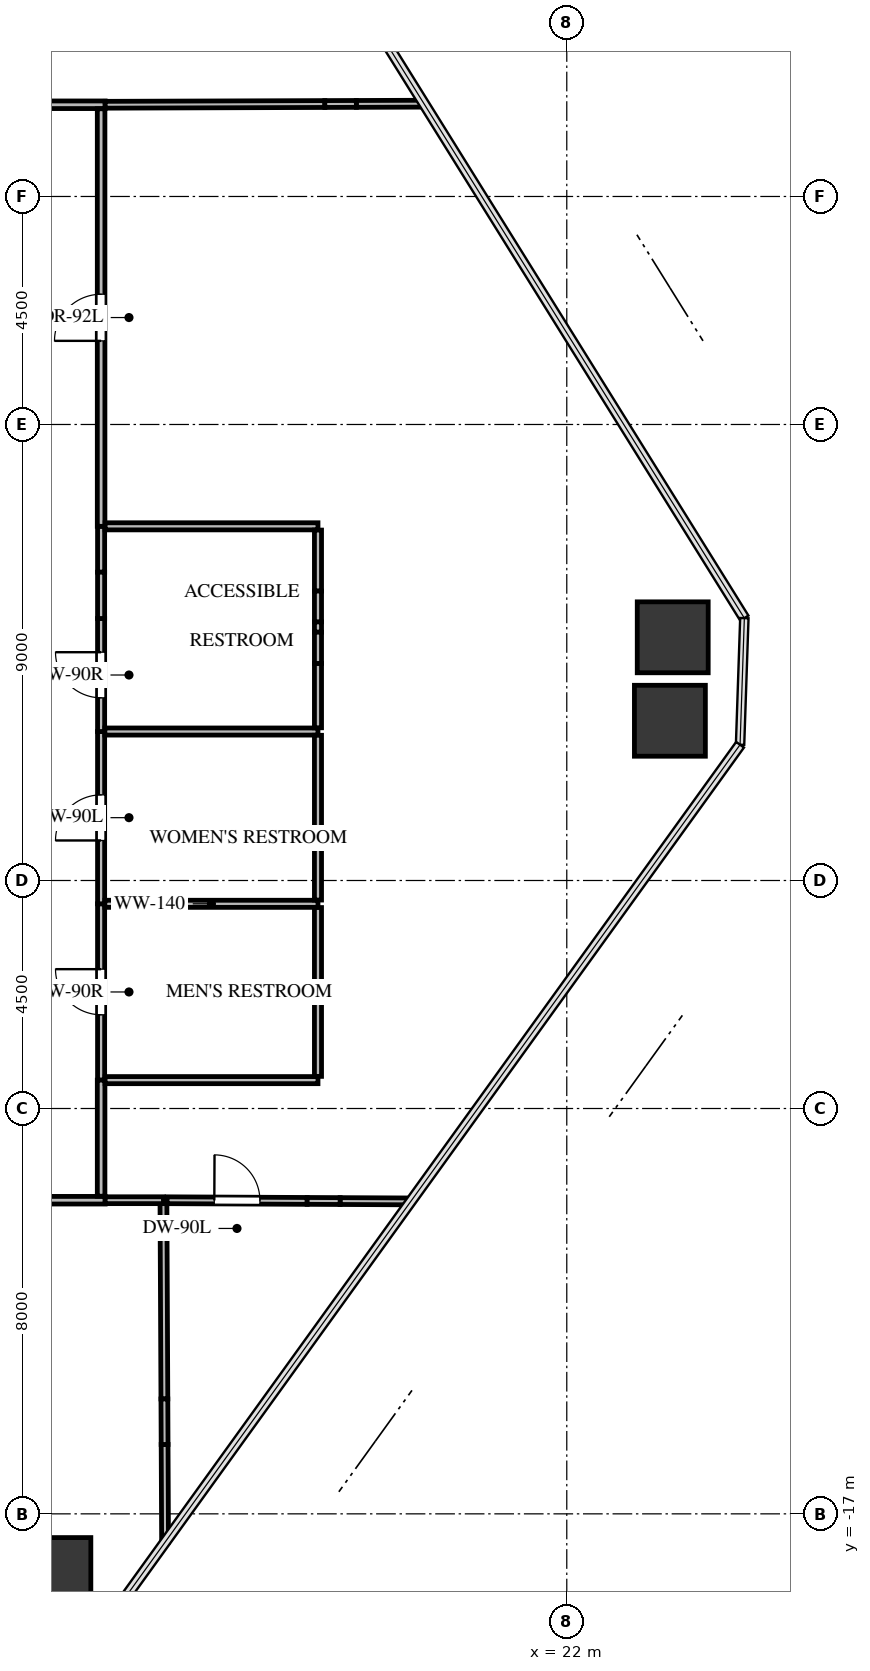
"""IFC4 building model, lengths in metres.
Left out: names, types, materials, properties, quantities, classifications, styles, units other than length and angle.
Written with IfcOpenShell. Run it as: python <this file> out.ifc"""

import sys

from ifc_helpers import new_model, si_unit, direction, frame, frame_2d, origin, origin_2d, place, context, subcontext, project, spatial, rectangle, extrude, source, transform, mapped, element, fill, save


model = new_model("IFC4")
c1 = context("Model", 3, precision=1e-05, world=origin(), true_north=direction((0.0, 1.0)))
c2 = subcontext(c1, "Body", "Model", "MODEL_VIEW")
j1 = project(units=[si_unit("LENGTHUNIT", "METRE"), si_unit("PLANEANGLEUNIT", "RADIAN")], contexts=[c1])
p1 = place(None, origin())
s1 = spatial("IfcSite", under=j1, at=p1, CompositionType="ELEMENT")
p2 = place(p1, origin())
s2 = spatial("IfcBuilding", under=s1, at=p2, CompositionType="ELEMENT")
p3 = place(p2, frame((0.0, 0.0, 81.3)))
s3 = spatial("IfcBuildingStorey", under=s2, at=p3, CompositionType="ELEMENT", Elevation=81.3)
m1 = source(origin(), c2, "Body", "SweptSolid", [
    extrude(rectangle(XDim=1.4, YDim=1.4, at=origin_2d()), origin(), (0.0, 0.0, 1.0), 3.0),
])
for number, where, z_axis, x_axis in (
    (1, (24.091, 0.3, -0.24), (0.0, 0.0, 1.0), (1.0, 0.0, 0.0)),
    (2, (24.035, -1.347, -0.24), (0.0, 0.0, 1.0), (1.0, 0.0, 0.0)),
    (3, (11.907, -18.168, -0.24), (0.0, 0.0, 1.0), (1.0, 0.0, 0.0)),
):
    element("IfcColumn", number, at=place(p3, frame(where, z_axis=z_axis, x_axis=x_axis)), inside=s3, PredefinedType="COLUMN", context=c2, shape_type="MappedRepresentation", body=[
        mapped(m1, transform((0.0, 0.0, 0.0), x_axis=(1.0, 0.0, 0.0), y_axis=(0.0, 1.0, 0.0), z_axis=(0.0, 0.0, 1.0), scale=1.0)),
    ])
p4 = place(p3, frame((12.81, -8.44, 0.0), z_axis=(0.0, 0.0, 1.0), x_axis=(0.0, 1.0, 0.0)))
e4 = element("IfcWall", 4, at=p4, inside=s3, PredefinedType="PARTITIONING", context=c2, shape_type="SweptSolid", body=[
    extrude(rectangle(XDim=3.48, YDim=0.14, at=frame_2d((1.74, 0.0))), origin(), (0.0, 0.0, 1.0), 2.745),
])
p5 = place(p4, frame((1.29, 0.0, 0.0)))
e5 = element("IfcOpeningElement", 5, at=p5, cuts=e4, PredefinedType="OPENING", context=c2, shape_type="SweptSolid", body=[
    extrude(rectangle(XDim=0.9, YDim=2.05, at=frame_2d((0.45, 1.025))), frame((0.0, 0.08, 0.0), z_axis=(0.0, -1.0, 0.0), x_axis=(1.0, 0.0, 0.0)), (0.0, 0.0, 1.0), 0.16),
])
p6 = place(p3, frame((12.81, -4.96, 0.0), z_axis=(0.0, 0.0, 1.0), x_axis=(0.0, 1.0, 0.0)))
e6 = element("IfcWall", 6, at=p6, inside=s3, PredefinedType="PARTITIONING", context=c2, shape_type="SweptSolid", body=[
    extrude(rectangle(XDim=3.4, YDim=0.14, at=frame_2d((1.7, 0.0))), origin(), (0.0, 0.0, 1.0), 2.745),
])
p7 = place(p6, frame((1.25, 0.0, 0.0)))
e7 = element("IfcOpeningElement", 7, at=p7, cuts=e6, PredefinedType="OPENING", context=c2, shape_type="SweptSolid", body=[
    extrude(rectangle(XDim=0.9, YDim=2.05, at=frame_2d((0.45, 1.025))), frame((0.0, 0.08, 0.0), z_axis=(0.0, -1.0, 0.0), x_axis=(1.0, 0.0, 0.0)), (0.0, 0.0, 1.0), 0.16),
])
p8 = place(p3, frame((12.81, -1.56, 0.0), z_axis=(0.0, 0.0, 1.0), x_axis=(0.0, 1.0, 0.0)))
e8 = element("IfcWall", 8, at=p8, inside=s3, PredefinedType="PARTITIONING", context=c2, shape_type="SweptSolid", body=[
    extrude(rectangle(XDim=2.231, YDim=0.14, at=frame_2d((1.116, 0.0))), origin(), (0.0, 0.0, 1.0), 2.745),
])
p9 = place(p8, frame((0.666, 0.0, 0.0)))
e9 = element("IfcOpeningElement", 9, at=p9, cuts=e8, PredefinedType="OPENING", context=c2, shape_type="SweptSolid", body=[
    extrude(rectangle(XDim=0.9, YDim=2.05, at=frame_2d((0.45, 1.025))), frame((0.0, 0.08, 0.0), z_axis=(0.0, -1.0, 0.0), x_axis=(1.0, 0.0, 0.0)), (0.0, 0.0, 1.0), 0.16),
])
p10 = place(p3, frame((12.81, 1.585, 0.0), z_axis=(0.0, 0.0, 1.0), x_axis=(0.0, 1.0, 0.0)))
e10 = element("IfcWall", 10, at=p10, inside=s3, PredefinedType="PARTITIONING", context=c2, shape_type="SweptSolid", body=[
    extrude(rectangle(XDim=0.905, YDim=0.14, at=frame_2d((0.453, 0.0))), origin(), (0.0, 0.0, 1.0), 2.745),
])
p11 = place(p3, frame((12.81, 0.671, 0.0), z_axis=(0.0, 0.0, 1.0), x_axis=(0.0, 1.0, 0.0)))
e11 = element("IfcWall", 11, at=p11, inside=s3, PredefinedType="PARTITIONING", context=c2, shape_type="SweptSolid", body=[
    extrude(rectangle(XDim=0.914, YDim=0.14, at=frame_2d((0.457, 0.0))), origin(), (0.0, 0.0, 1.0), 1.83),
])
p12 = place(p3, frame((12.89, 10.81, 0.0), z_axis=(0.0, 0.0, 1.0), x_axis=(-1.0, 0.0, 0.0)))
e12 = element("IfcWall", 12, at=p12, inside=s3, PredefinedType="PARTITIONING", context=c2, shape_type="SweptSolid", body=[
    extrude(rectangle(XDim=1.847, YDim=0.15, at=frame_2d((0.924, 0.0))), origin(), (0.0, 0.0, 1.0), 2.745),
])
p13 = place(p3, frame((5.817, -10.81, 0.0), z_axis=(0.0, 0.0, 1.0), x_axis=(1.0, 0.0, 0.0)))
e13 = element("IfcWall", 13, at=p13, inside=s3, PredefinedType="PARTITIONING", context=c2, shape_type="SweptSolid", body=[
    extrude(rectangle(XDim=7.073, YDim=0.15, at=frame_2d((3.536, 0.0))), origin(), (0.0, 0.0, 1.0), 1.83),
])
p14 = place(p3, frame((12.81, 2.49, 0.0), z_axis=(0.0, 0.0, 1.0), x_axis=(0.0, 1.0, 0.0)))
e14 = element("IfcWall", 14, at=p14, inside=s3, PredefinedType="PARTITIONING", context=c2, shape_type="SweptSolid", body=[
    extrude(rectangle(XDim=8.241, YDim=0.15, at=frame_2d((4.121, 0.0))), origin(), (0.0, 0.0, 1.0), 2.745),
])
p15 = place(p14, frame((3.66, 0.0, 0.0)))
e15 = element("IfcOpeningElement", 15, at=p15, cuts=e14, PredefinedType="OPENING", context=c2, shape_type="SweptSolid", body=[
    extrude(rectangle(XDim=0.92, YDim=2.1, at=frame_2d((0.46, 1.05))), frame((0.0, 0.085, 0.0), z_axis=(0.0, -1.0, 0.0), x_axis=(1.0, 0.0, 0.0)), (0.0, 0.0, 1.0), 0.17),
])
p16 = place(p3, frame((12.81, -10.731, 0.0), z_axis=(0.0, 0.0, 1.0), x_axis=(0.0, 1.0, 0.0)))
e16 = element("IfcWall", 16, at=p16, inside=s3, PredefinedType="PARTITIONING", context=c2, shape_type="SweptSolid", body=[
    extrude(rectangle(XDim=2.291, YDim=0.15, at=frame_2d((1.146, 0.0))), origin(), (0.0, 0.0, 1.0), 2.745),
])
p17 = place(p3, frame((12.884, -4.96, 0.0), z_axis=(0.0, 0.0, 1.0), x_axis=(1.0, 0.0, 0.0)))
e17 = element("IfcWall", 17, at=p17, inside=s3, PredefinedType="PARTITIONING", context=c2, shape_type="SweptSolid", body=[
    extrude(rectangle(XDim=4.206, YDim=0.14, at=frame_2d((2.103, 0.0))), origin(), (0.0, 0.0, 1.0), 2.745),
])
p18 = place(p3, frame((17.09, -8.44, 0.0), z_axis=(0.0, 0.0, 1.0), x_axis=(-1.0, 0.0, 0.0)))
e18 = element("IfcWall", 18, at=p18, inside=s3, PredefinedType="PARTITIONING", context=c2, shape_type="SweptSolid", body=[
    extrude(rectangle(XDim=4.201, YDim=0.14, at=frame_2d((2.101, 0.0))), origin(), (0.0, 0.0, 1.0), 2.745),
])
p19 = place(p3, frame((17.09, -5.034, 0.0), z_axis=(0.0, 0.0, 1.0), x_axis=(0.0, -1.0, 0.0)))
e19 = element("IfcWall", 19, at=p19, inside=s3, PredefinedType="PARTITIONING", context=c2, shape_type="SweptSolid", body=[
    extrude(rectangle(XDim=3.332, YDim=0.14, at=frame_2d((1.666, 0.0))), origin(), (0.0, 0.0, 1.0), 2.745),
])
p20 = place(p3, frame((12.884, -1.56, 0.0), z_axis=(0.0, 0.0, 1.0), x_axis=(1.0, 0.0, 0.0)))
e20 = element("IfcWall", 20, at=p20, inside=s3, PredefinedType="PARTITIONING", context=c2, shape_type="SweptSolid", body=[
    extrude(rectangle(XDim=4.206, YDim=0.14, at=frame_2d((2.103, 0.0))), origin(), (0.0, 0.0, 1.0), 2.745),
])
p21 = place(p3, frame((17.09, -1.634, 0.0), z_axis=(0.0, 0.0, 1.0), x_axis=(0.0, -1.0, 0.0)))
e21 = element("IfcWall", 21, at=p21, inside=s3, PredefinedType="PARTITIONING", context=c2, shape_type="SweptSolid", body=[
    extrude(rectangle(XDim=3.252, YDim=0.14, at=frame_2d((1.626, 0.0))), origin(), (0.0, 0.0, 1.0), 2.745),
])
p22 = place(p3, frame((12.889, 2.49, 0.0), z_axis=(0.0, 0.0, 1.0), x_axis=(1.0, 0.0, 0.0)))
e22 = element("IfcWall", 22, at=p22, inside=s3, PredefinedType="PARTITIONING", context=c2, shape_type="SweptSolid", body=[
    extrude(rectangle(XDim=4.201, YDim=0.14, at=frame_2d((2.101, 0.0))), origin(), (0.0, 0.0, 1.0), 2.745),
])
p23 = place(p3, frame((17.09, 2.416, 0.0), z_axis=(0.0, 0.0, 1.0), x_axis=(0.0, -1.0, 0.0)))
e23 = element("IfcWall", 23, at=p23, inside=s3, PredefinedType="PARTITIONING", context=c2, shape_type="SweptSolid", body=[
    extrude(rectangle(XDim=1.204, YDim=0.14, at=frame_2d((0.602, 0.0))), origin(), (0.0, 0.0, 1.0), 2.745),
])
p24 = place(p3, frame((17.09, 0.606, 0.0), z_axis=(0.0, 0.0, 1.0), x_axis=(0.0, -1.0, 0.0)))
e24 = element("IfcWall", 24, at=p24, inside=s3, PredefinedType="PARTITIONING", context=c2, shape_type="SweptSolid", body=[
    extrude(rectangle(XDim=0.205, YDim=0.14, at=frame_2d((0.103, 0.0))), origin(), (0.0, 0.0, 1.0), 2.745),
])
p25 = place(p3, frame((17.09, -0.216, 0.0), z_axis=(0.0, 0.0, 1.0), x_axis=(0.0, -1.0, 0.0)))
e25 = element("IfcWall", 25, at=p25, inside=s3, PredefinedType="PARTITIONING", context=c2, shape_type="SweptSolid", body=[
    extrude(rectangle(XDim=1.27, YDim=0.14, at=frame_2d((0.635, 0.0))), origin(), (0.0, 0.0, 1.0), 2.745),
])
p26 = place(p3, frame((17.09, 1.212, 0.0), z_axis=(0.0, 0.0, 1.0), x_axis=(0.0, -1.0, 0.0)))
e26 = element("IfcWall", 26, at=p26, inside=s3, PredefinedType="PARTITIONING", context=c2, shape_type="SweptSolid", body=[
    extrude(rectangle(XDim=0.606, YDim=0.14, at=frame_2d((0.303, 0.0))), origin(), (0.0, 0.0, 1.0), 1.83),
])
p27 = place(p3, frame((17.09, 0.401, 0.0), z_axis=(0.0, 0.0, 1.0), x_axis=(0.0, -1.0, 0.0)))
e27 = element("IfcWall", 27, at=p27, inside=s3, PredefinedType="PARTITIONING", context=c2, shape_type="SweptSolid", body=[
    extrude(rectangle(XDim=0.617, YDim=0.14, at=frame_2d((0.309, 0.0))), origin(), (0.0, 0.0, 1.0), 1.83),
])
p28 = place(p3, frame((19.182, 10.831, 0.0), z_axis=(0.0, 0.0, 1.0), x_axis=(-0.999994579825, -0.00329246432, 0.0)))
e28 = element("IfcWall", 28, at=p28, inside=s3, PredefinedType="PARTITIONING", context=c2, shape_type="SweptSolid", body=[
    extrude(rectangle(XDim=1.335, YDim=0.135, at=frame_2d((0.667, 0.0))), origin(), (0.0, 0.0, 1.0), 2.745),
])
p29 = place(p3, frame((17.225, 10.825, 0.0), z_axis=(0.0, 0.0, 1.0), x_axis=(-0.999994480721, -0.003322427884, 0.0)))
e29 = element("IfcWall", 29, at=p29, inside=s3, PredefinedType="PARTITIONING", context=c2, shape_type="SweptSolid", body=[
    extrude(rectangle(XDim=4.335, YDim=0.135, at=frame_2d((2.168, 0.0))), origin(), (0.0, 0.0, 1.0), 2.745),
])
p30 = place(p3, frame((17.847, 10.827, 0.0), z_axis=(0.0, 0.0, 1.0), x_axis=(-0.999993761903, -0.00353216007, 0.0)))
e30 = element("IfcWall", 30, at=p30, inside=s3, PredefinedType="PARTITIONING", context=c2, shape_type="SweptSolid", body=[
    extrude(rectangle(XDim=0.622, YDim=0.135, at=frame_2d((0.311, 0.0))), origin(), (0.0, 0.0, 1.0), 2.08),
])
p31 = place(p3, frame((14.04, -10.81, 0.0), z_axis=(0.0, 0.0, 1.0), x_axis=(0.004792973268, -0.999988513638, 0.0)))
e31 = element("IfcWall", 31, at=p31, inside=s3, PredefinedType="PARTITIONING", context=c2, shape_type="SweptSolid", body=[
    extrude(rectangle(XDim=3.922, YDim=0.135, at=frame_2d((1.961, 0.0))), origin(), (0.0, 0.0, 1.0), 2.08),
])
p32 = place(p3, frame((14.063, -15.631, 0.0), z_axis=(0.0, 0.0, 1.0), x_axis=(0.004936648705, -0.999987814676, 0.0)))
e32 = element("IfcWall", 32, at=p32, inside=s3, PredefinedType="PARTITIONING", context=c2, shape_type="SweptSolid", body=[
    extrude(rectangle(XDim=1.929, YDim=0.135, at=frame_2d((0.964, 0.0))), origin(), (0.0, 0.0, 1.0), 2.08),
])
p33 = place(p3, frame((14.059, -14.732, 0.0), z_axis=(0.0, 0.0, 1.0), x_axis=(0.004618260991, -0.999989335776, 0.0)))
e33 = element("IfcWall", 33, at=p33, inside=s3, PredefinedType="PARTITIONING", context=c2, shape_type="SweptSolid", body=[
    extrude(rectangle(XDim=0.899, YDim=0.135, at=frame_2d((0.449, 0.0))), origin(), (0.0, 0.0, 1.0), 2.08),
])
p34 = place(p3, frame((12.89, -10.81, 0.0), z_axis=(0.0, 0.0, 1.0), x_axis=(1.0, 0.0, 0.0)))
e34 = element("IfcWall", 34, at=p34, inside=s3, PredefinedType="PARTITIONING", context=c2, shape_type="SweptSolid", body=[
    extrude(rectangle(XDim=1.15, YDim=0.135, at=frame_2d((0.575, 0.0))), origin(), (0.0, 0.0, 1.0), 2.745),
])
p35 = place(p3, frame((14.112, -10.811, 0.0), z_axis=(0.0, 0.0, 1.0), x_axis=(0.999989051327, -0.004679447265, 0.0)))
e35 = element("IfcWall", 35, at=p35, inside=s3, PredefinedType="PARTITIONING", context=c2, shape_type="SweptSolid", body=[
    extrude(rectangle(XDim=2.765, YDim=0.135, at=frame_2d((1.383, 0.0))), origin(), (0.0, 0.0, 1.0), 2.745),
])
p36 = place(p35, frame((0.933, 0.0, 0.0)))
e36 = element("IfcOpeningElement", 36, at=p36, cuts=e35, PredefinedType="OPENING", context=c2, shape_type="SweptSolid", body=[
    extrude(rectangle(XDim=0.9, YDim=2.05, at=frame_2d((0.45, 1.025))), frame((0.0, 0.078, 0.0), z_axis=(0.0, -1.0, 0.0), x_axis=(1.0, 0.0, 0.0)), (0.0, 0.0, 1.0), 0.155),
])
p37 = place(p3, frame((17.527, -10.827, 0.0), z_axis=(0.0, 0.0, 1.0), x_axis=(0.999988840164, -0.004724356725, 0.0)))
e37 = element("IfcWall", 37, at=p37, inside=s3, PredefinedType="PARTITIONING", context=c2, shape_type="SweptSolid", body=[
    extrude(rectangle(XDim=1.395, YDim=0.135, at=frame_2d((0.698, 0.0))), origin(), (0.0, 0.0, 1.0), 2.745),
])
p38 = place(p3, frame((16.877, -10.824, 0.0), z_axis=(0.0, 0.0, 1.0), x_axis=(0.999988075702, -0.004883487973, 0.0)))
e38 = element("IfcWall", 38, at=p38, inside=s3, PredefinedType="PARTITIONING", context=c2, shape_type="SweptSolid", body=[
    extrude(rectangle(XDim=0.65, YDim=0.135, at=frame_2d((0.325, 0.0))), origin(), (0.0, 0.0, 1.0), 2.08),
])
m2 = source(origin(), c2, "Body", "SweptSolid", [
    extrude(rectangle(XDim=0.9, YDim=2.05, at=frame_2d((0.45, 1.025))), frame((0.0, 0.025, 0.0), z_axis=(0.0, -1.0, 0.0), x_axis=(1.0, 0.0, 0.0)), (0.0, 0.0, 1.0), 0.05),
])
p39 = place(p5, origin())
e39 = element("IfcDoor", 39, at=p39, inside=s3, OperationType="SINGLE_SWING_RIGHT", PredefinedType="DOOR", context=c2, shape_type="MappedRepresentation", body=[
    mapped(m2, transform((0.0, 0.0, 0.0), x_axis=(1.0, 0.0, 0.0), y_axis=(0.0, 1.0, 0.0), z_axis=(0.0, 0.0, 1.0), scale=1.0)),
])
fill(e5, e39)
m3 = source(origin(), c2, "Body", "SweptSolid", [
    extrude(rectangle(XDim=0.9, YDim=2.05, at=frame_2d((0.45, 1.025))), frame((0.0, 0.025, 0.0), z_axis=(0.0, -1.0, 0.0), x_axis=(1.0, 0.0, 0.0)), (0.0, 0.0, 1.0), 0.05),
])
p40 = place(p7, origin())
e40 = element("IfcDoor", 40, at=p40, inside=s3, OperationType="SINGLE_SWING_LEFT", PredefinedType="DOOR", context=c2, shape_type="MappedRepresentation", body=[
    mapped(m3, transform((0.0, 0.0, 0.0), x_axis=(1.0, 0.0, 0.0), y_axis=(0.0, 1.0, 0.0), z_axis=(0.0, 0.0, 1.0), scale=1.0)),
])
fill(e7, e40)
p41 = place(p9, origin())
e41 = element("IfcDoor", 41, at=p41, inside=s3, OperationType="SINGLE_SWING_RIGHT", PredefinedType="DOOR", context=c2, shape_type="MappedRepresentation", body=[
    mapped(m2, transform((0.0, 0.0, 0.0), x_axis=(1.0, 0.0, 0.0), y_axis=(0.0, 1.0, 0.0), z_axis=(0.0, 0.0, 1.0), scale=1.0)),
])
fill(e9, e41)
m4 = source(origin(), c2, "Body", "SweptSolid", [
    extrude(rectangle(XDim=0.92, YDim=2.1, at=frame_2d((0.46, 1.05))), frame((0.0, 0.025, 0.0), z_axis=(0.0, -1.0, 0.0), x_axis=(1.0, 0.0, 0.0)), (0.0, 0.0, 1.0), 0.05),
])
p42 = place(p15, origin())
e42 = element("IfcDoor", 42, at=p42, inside=s3, OperationType="SINGLE_SWING_LEFT", PredefinedType="DOOR", context=c2, shape_type="MappedRepresentation", body=[
    mapped(m4, transform((0.0, 0.0, 0.0), x_axis=(1.0, 0.0, 0.0), y_axis=(0.0, 1.0, 0.0), z_axis=(0.0, 0.0, 1.0), scale=1.0)),
])
fill(e15, e42)
p43 = place(p36, origin())
e43 = element("IfcDoor", 43, at=p43, inside=s3, OperationType="SINGLE_SWING_LEFT", PredefinedType="DOOR", context=c2, shape_type="MappedRepresentation", body=[
    mapped(m3, transform((0.0, 0.0, 0.0), x_axis=(1.0, 0.0, 0.0), y_axis=(0.0, 1.0, 0.0), z_axis=(0.0, 0.0, 1.0), scale=1.0)),
])
fill(e36, e43)
save(model, sys.argv[1])
